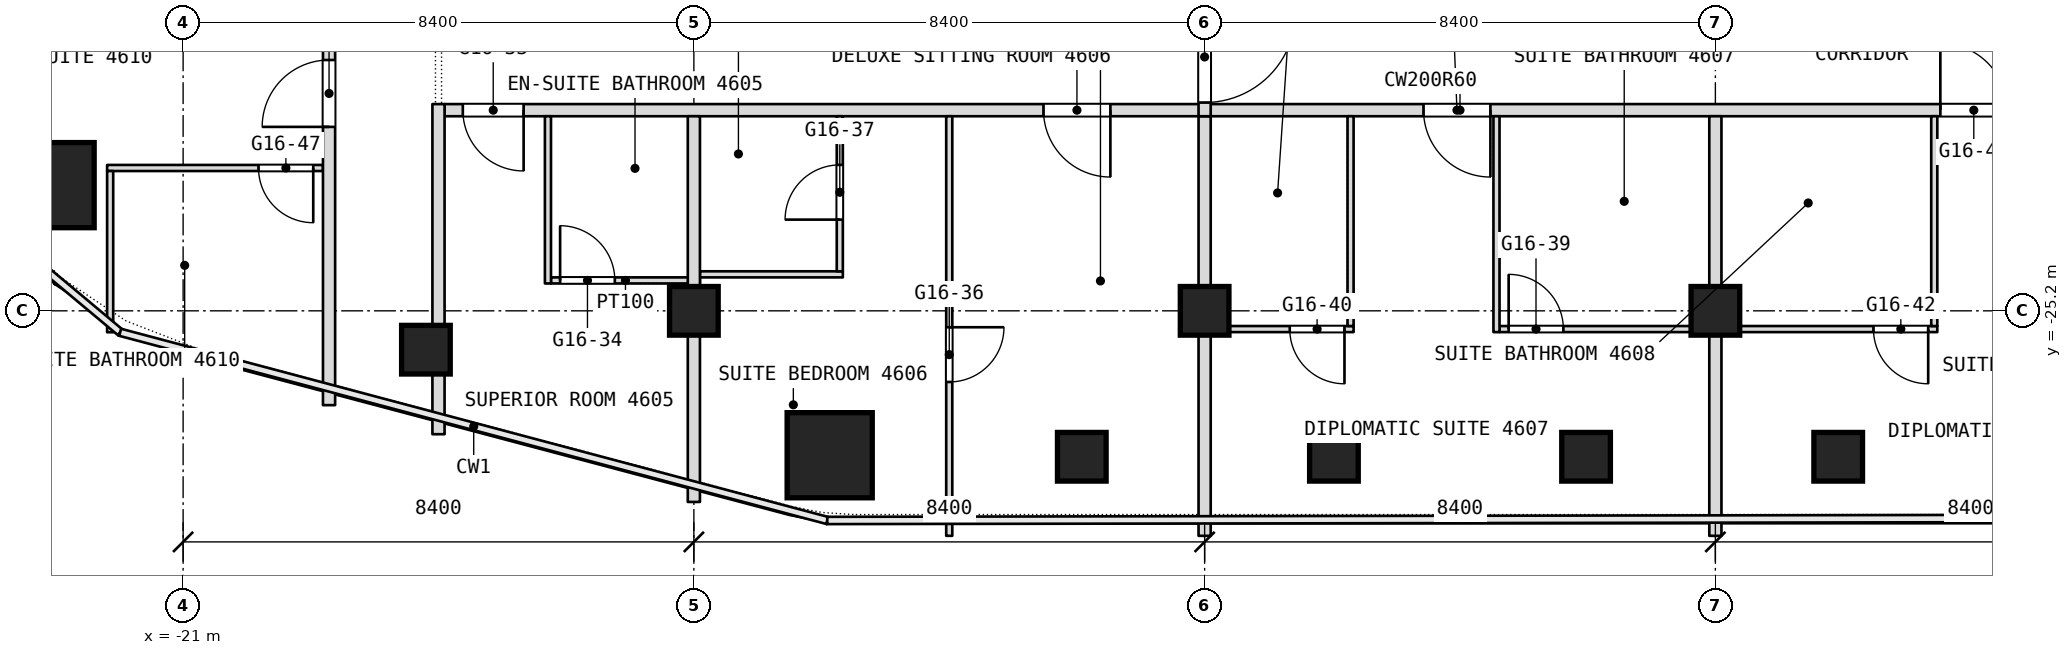
"""IFC4 building model, lengths in metres.
Left out: names, types, materials, properties, quantities, classifications, styles, units other than length and angle.
Written with IfcOpenShell. Run it as: python <this file> out.ifc"""

import sys

from ifc_helpers import new_model, si_unit, direction, frame, frame_2d, origin, origin_2d, place, context, subcontext, project, spatial, rectangle, extrude, element, fill, save


model = new_model("IFC4")
c1 = context("Model", 3, precision=1e-05, world=origin(), true_north=direction((0.0, 1.0)))
c2 = subcontext(c1, "Body", "Model", "MODEL_VIEW")
j1 = project(units=[si_unit("LENGTHUNIT", "METRE"), si_unit("PLANEANGLEUNIT", "RADIAN")], contexts=[c1])
p1 = place(None, origin())
s1 = spatial("IfcSite", under=j1, at=p1, CompositionType="ELEMENT")
p2 = place(p1, origin())
s2 = spatial("IfcBuilding", under=s1, at=p2, CompositionType="ELEMENT")
p3 = place(p2, frame((0.0, 0.0, 202.1)))
s3 = spatial("IfcBuildingStorey", under=s2, at=p3, CompositionType="ELEMENT", Elevation=202.1)
for number, where, z_axis, x_axis in (
    (1, (-23.163, -23.133, 0.0), (0.0, 0.0, 1.0), (1.0, 0.0, 0.0)),
    (2, (-10.366, -27.575, 0.0), (0.0, 0.0, 1.0), (1.0, 0.0, 0.0)),
):
    element("IfcColumn", number, at=place(p3, frame(where, z_axis=z_axis, x_axis=x_axis)), inside=s3, PredefinedType="COLUMN", context=c2, shape_type="SweptSolid", body=[
        extrude(rectangle(XDim=1.4, YDim=1.4, at=origin_2d()), origin(), (0.0, 0.0, 1.0), 3.6),
    ])
for number, where, z_axis, x_axis in (
    (3, (-12.6, -25.2, 0.0), (0.0, 0.0, 1.0), (1.0, 0.0, 0.0)),
    (4, (-4.2, -25.2, 0.0), (0.0, 0.0, 1.0), (1.0, 0.0, 0.0)),
    (5, (4.2, -25.2, 0.0), (0.0, 0.0, 1.0), (1.0, 0.0, 0.0)),
    (6, (6.22, -27.6, 0.0), (0.0, 0.0, 1.0), (1.0, 0.0, 0.0)),
    (7, (2.073, -27.6, 0.0), (0.0, 0.0, 1.0), (1.0, 0.0, 0.0)),
    (8, (-2.073, -27.6, 0.0), (0.0, 0.0, 1.0), (1.0, 0.0, 0.0)),
    (9, (-6.22, -27.6, 0.0), (0.0, 0.0, 1.0), (1.0, 0.0, 0.0)),
    (10, (-17.007, -25.839, 0.0), (0.0, 0.0, 1.0), (1.0, 0.0, 0.0)),
):
    element("IfcColumn", number, at=place(p3, frame(where, z_axis=z_axis, x_axis=x_axis)), inside=s3, PredefinedType="COLUMN", context=c2, shape_type="SweptSolid", body=[
        extrude(rectangle(XDim=0.8, YDim=0.8, at=origin_2d()), origin(), (0.0, 0.0, 1.0), 3.6),
    ])
p4 = place(p3, frame((-4.1, -25.5, 0.0), z_axis=(0.0, 0.0, 1.0), x_axis=(1.0, 0.0, 0.0)))
e11 = element("IfcWall", 11, at=p4, inside=s3, PredefinedType="PARTITIONING", context=c2, shape_type="SweptSolid", body=[
    extrude(rectangle(XDim=2.35, YDim=0.1, at=frame_2d((1.175, 0.0))), origin(), (0.0, 0.0, 1.0), 3.34),
])
p5 = place(p4, frame((1.3, 0.0, 0.0)))
e12 = element("IfcOpeningElement", 12, at=p5, cuts=e11, PredefinedType="OPENING", context=c2, shape_type="SweptSolid", body=[
    extrude(rectangle(XDim=0.9, YDim=2.1, at=frame_2d((0.45, 1.05))), frame((0.0, 0.05, 0.0), z_axis=(0.0, -1.0, 0.0), x_axis=(1.0, 0.0, 0.0)), (0.0, 0.0, 1.0), 0.1),
])
p6 = place(p3, frame((0.65, -25.5, 0.0), z_axis=(0.0, 0.0, 1.0), x_axis=(1.0, 0.0, 0.0)))
e13 = element("IfcWall", 13, at=p6, inside=s3, PredefinedType="PARTITIONING", context=c2, shape_type="SweptSolid", body=[
    extrude(rectangle(XDim=7.2, YDim=0.1, at=frame_2d((3.6, 0.0))), origin(), (0.0, 0.0, 1.0), 3.34),
])
p7 = place(p6, frame((0.15, 0.0, 0.0)))
e14 = element("IfcOpeningElement", 14, at=p7, cuts=e13, PredefinedType="OPENING", context=c2, shape_type="SweptSolid", body=[
    extrude(rectangle(XDim=0.9, YDim=2.1, at=frame_2d((0.45, 1.05))), frame((0.0, 0.05, 0.0), z_axis=(0.0, -1.0, 0.0), x_axis=(1.0, 0.0, 0.0)), (0.0, 0.0, 1.0), 0.1),
])
p8 = place(p6, frame((6.15, 0.0, 0.0)))
e15 = element("IfcOpeningElement", 15, at=p8, cuts=e13, PredefinedType="OPENING", context=c2, shape_type="SweptSolid", body=[
    extrude(rectangle(XDim=0.9, YDim=2.1, at=frame_2d((0.45, 1.05))), frame((0.0, 0.05, 0.0), z_axis=(0.0, -1.0, 0.0), x_axis=(1.0, 0.0, 0.0)), (0.0, 0.0, 1.0), 0.1),
])
p9 = place(p3, frame((-14.95, -24.7, 0.0), z_axis=(0.0, 0.0, 1.0), x_axis=(1.0, 0.0, 0.0)))
e16 = element("IfcWall", 16, at=p9, inside=s3, PredefinedType="PARTITIONING", context=c2, shape_type="SweptSolid", body=[
    extrude(rectangle(XDim=2.45, YDim=0.1, at=frame_2d((1.225, 0.0))), origin(), (0.0, 0.0, 1.0), 3.34),
])
p10 = place(p9, frame((0.15, 0.0, 0.0)))
e17 = element("IfcOpeningElement", 17, at=p10, cuts=e16, PredefinedType="OPENING", context=c2, shape_type="SweptSolid", body=[
    extrude(rectangle(XDim=0.9, YDim=2.1, at=frame_2d((0.45, 1.05))), frame((0.0, 0.05, 0.0), z_axis=(0.0, -1.0, 0.0), x_axis=(1.0, 0.0, 0.0)), (0.0, 0.0, 1.0), 0.1),
])
p11 = place(p3, frame((-12.5, -24.6, 0.0), z_axis=(0.0, 0.0, 1.0), x_axis=(1.0, 0.0, 0.0)))
e18 = element("IfcWall", 18, at=p11, inside=s3, PredefinedType="PARTITIONING", context=c2, shape_type="SweptSolid", body=[
    extrude(rectangle(XDim=2.35, YDim=0.1, at=frame_2d((1.175, 0.0))), origin(), (0.0, 0.0, 1.0), 3.34),
])
p12 = place(p3, frame((-22.25, -22.851, 0.0), z_axis=(0.0, 0.0, 1.0), x_axis=(1.0, 0.0, 0.0)))
e19 = element("IfcWall", 19, at=p12, inside=s3, PredefinedType="PARTITIONING", context=c2, shape_type="SweptSolid", body=[
    extrude(rectangle(XDim=3.55, YDim=0.1, at=frame_2d((1.775, 0.0))), origin(), (0.0, 0.0, 1.0), 3.34),
])
p13 = place(p12, frame((2.49, 0.0, 0.0)))
e20 = element("IfcOpeningElement", 20, at=p13, cuts=e19, PredefinedType="OPENING", context=c2, shape_type="SweptSolid", body=[
    extrude(rectangle(XDim=0.9, YDim=2.1, at=frame_2d((0.45, 1.05))), frame((0.0, 0.05, 0.0), z_axis=(0.0, -1.0, 0.0), x_axis=(1.0, 0.0, 0.0)), (0.0, 0.0, 1.0), 0.1),
])
p14 = place(p3, frame((-16.7, -21.9, 0.0), z_axis=(0.0, 0.0, 1.0), x_axis=(1.0, 0.0, 0.0)))
e21 = element("IfcWall", 21, at=p14, inside=s3, PredefinedType="PARTITIONING", context=c2, shape_type="SweptSolid", body=[
    extrude(rectangle(XDim=33.4, YDim=0.2, at=frame_2d((16.7, 0.0))), origin(), (0.0, 0.0, 1.0), 3.34),
])
p15 = place(p14, frame((0.3, 0.0, 0.0)))
e22 = element("IfcOpeningElement", 22, at=p15, cuts=e21, PredefinedType="OPENING", context=c2, shape_type="SweptSolid", body=[
    extrude(rectangle(XDim=1.0, YDim=2.1, at=frame_2d((0.5, 1.05))), frame((0.0, 0.1, 0.0), z_axis=(0.0, -1.0, 0.0), x_axis=(1.0, 0.0, 0.0)), (0.0, 0.0, 1.0), 0.2),
])
p16 = place(p14, frame((9.85, 0.0, 0.0)))
e23 = element("IfcOpeningElement", 23, at=p16, cuts=e21, PredefinedType="OPENING", context=c2, shape_type="SweptSolid", body=[
    extrude(rectangle(XDim=1.1, YDim=2.1, at=frame_2d((0.55, 1.05))), frame((0.0, 0.1, 0.0), z_axis=(0.0, -1.0, 0.0), x_axis=(1.0, 0.0, 0.0)), (0.0, 0.0, 1.0), 0.2),
])
p17 = place(p14, frame((16.1, 0.0, 0.0)))
e24 = element("IfcOpeningElement", 24, at=p17, cuts=e21, PredefinedType="OPENING", context=c2, shape_type="SweptSolid", body=[
    extrude(rectangle(XDim=1.1, YDim=2.1, at=frame_2d((0.55, 1.05))), frame((0.0, 0.1, 0.0), z_axis=(0.0, -1.0, 0.0), x_axis=(1.0, 0.0, 0.0)), (0.0, 0.0, 1.0), 0.2),
])
p18 = place(p14, frame((24.6, 0.0, 0.0)))
e25 = element("IfcOpeningElement", 25, at=p18, cuts=e21, PredefinedType="OPENING", context=c2, shape_type="SweptSolid", body=[
    extrude(rectangle(XDim=1.1, YDim=2.1, at=frame_2d((0.55, 1.05))), frame((0.0, 0.1, 0.0), z_axis=(0.0, -1.0, 0.0), x_axis=(1.0, 0.0, 0.0)), (0.0, 0.0, 1.0), 0.2),
])
p19 = place(p14, frame((29.7, 0.0, 0.0)))
e26 = element("IfcOpeningElement", 26, at=p19, cuts=e21, PredefinedType="OPENING", context=c2, shape_type="SweptSolid", body=[
    extrude(rectangle(XDim=1.0, YDim=2.1, at=frame_2d((0.5, 1.05))), frame((0.0, 0.1, 0.0), z_axis=(0.0, -1.0, 0.0), x_axis=(1.0, 0.0, 0.0)), (0.0, 0.0, 1.0), 0.2),
])
p20 = place(p3, frame((7.8, -25.45, 0.0), z_axis=(0.0, 0.0, 1.0), x_axis=(0.0, 1.0, 0.0)))
e27 = element("IfcWall", 27, at=p20, inside=s3, PredefinedType="PARTITIONING", context=c2, shape_type="SweptSolid", body=[
    extrude(rectangle(XDim=3.45, YDim=0.1, at=frame_2d((1.725, 0.0))), origin(), (0.0, 0.0, 1.0), 3.34),
])
p21 = place(p3, frame((4.2, -28.9, 0.0), z_axis=(0.0, 0.0, 1.0), x_axis=(0.0, 1.0, 0.0)))
e28 = element("IfcWall", 28, at=p21, inside=s3, PredefinedType="PARTITIONING", context=c2, shape_type="SweptSolid", body=[
    extrude(rectangle(XDim=6.9, YDim=0.2, at=frame_2d((3.45, 0.0))), origin(), (0.0, 0.0, 1.0), 3.34),
])
p22 = place(p3, frame((0.6, -25.55, 0.0), z_axis=(0.0, 0.0, 1.0), x_axis=(0.0, 1.0, 0.0)))
e29 = element("IfcWall", 29, at=p22, inside=s3, PredefinedType="PARTITIONING", context=c2, shape_type="SweptSolid", body=[
    extrude(rectangle(XDim=3.55, YDim=0.1, at=frame_2d((1.775, 0.0))), origin(), (0.0, 0.0, 1.0), 3.34),
])
p23 = place(p3, frame((-1.8, -25.45, 0.0), z_axis=(0.0, 0.0, 1.0), x_axis=(0.0, 1.0, 0.0)))
e30 = element("IfcWall", 30, at=p23, inside=s3, PredefinedType="PARTITIONING", context=c2, shape_type="SweptSolid", body=[
    extrude(rectangle(XDim=3.45, YDim=0.1, at=frame_2d((1.725, 0.0))), origin(), (0.0, 0.0, 1.0), 3.34),
])
p24 = place(p3, frame((-4.2, -28.9, 0.0), z_axis=(0.0, 0.0, 1.0), x_axis=(0.0, 1.0, 0.0)))
e31 = element("IfcWall", 31, at=p24, inside=s3, PredefinedType="PARTITIONING", context=c2, shape_type="SweptSolid", body=[
    extrude(rectangle(XDim=6.9, YDim=0.2, at=frame_2d((3.45, 0.0))), origin(), (0.0, 0.0, 1.0), 3.34),
])
p25 = place(p3, frame((-4.2, -22.0, 0.0), z_axis=(0.0, 0.0, 1.0), x_axis=(0.0, 1.0, 0.0)))
e32 = element("IfcWall", 32, at=p25, inside=s3, PredefinedType="PARTITIONING", context=c2, shape_type="SweptSolid", body=[
    extrude(rectangle(XDim=8.4, YDim=0.2, at=frame_2d((4.2, 0.0))), origin(), (0.0, 0.0, 1.0), 3.34),
])
p26 = place(p25, frame((0.225, 0.0, 0.0)))
e33 = element("IfcOpeningElement", 33, at=p26, cuts=e32, PredefinedType="OPENING", context=c2, shape_type="SweptSolid", body=[
    extrude(rectangle(XDim=1.5, YDim=2.1, at=frame_2d((0.75, 1.05))), frame((0.0, 0.1, 0.0), z_axis=(0.0, -1.0, 0.0), x_axis=(1.0, 0.0, 0.0)), (0.0, 0.0, 1.0), 0.2),
])
p27 = place(p3, frame((-8.4, -28.9, 0.0), z_axis=(0.0, 0.0, 1.0), x_axis=(0.0, 1.0, 0.0)))
e34 = element("IfcWall", 34, at=p27, inside=s3, PredefinedType="PARTITIONING", context=c2, shape_type="SweptSolid", body=[
    extrude(rectangle(XDim=6.9, YDim=0.1, at=frame_2d((3.45, 0.0))), origin(), (0.0, 0.0, 1.0), 3.34),
])
p28 = place(p27, frame((2.53, 0.0, 0.0)))
e35 = element("IfcOpeningElement", 35, at=p28, cuts=e34, PredefinedType="OPENING", context=c2, shape_type="SweptSolid", body=[
    extrude(rectangle(XDim=0.9, YDim=2.1, at=frame_2d((0.45, 1.05))), frame((0.0, 0.05, 0.0), z_axis=(0.0, -1.0, 0.0), x_axis=(1.0, 0.0, 0.0)), (0.0, 0.0, 1.0), 0.1),
])
p29 = place(p3, frame((-10.2, -24.55, 0.0), z_axis=(0.0, 0.0, 1.0), x_axis=(0.0, 1.0, 0.0)))
e36 = element("IfcWall", 36, at=p29, inside=s3, PredefinedType="PARTITIONING", context=c2, shape_type="SweptSolid", body=[
    extrude(rectangle(XDim=2.55, YDim=0.1, at=frame_2d((1.275, 0.0))), origin(), (0.0, 0.0, 1.0), 3.34),
])
p30 = place(p29, frame((0.85, 0.0, 0.0)))
e37 = element("IfcOpeningElement", 37, at=p30, cuts=e36, PredefinedType="OPENING", context=c2, shape_type="SweptSolid", body=[
    extrude(rectangle(XDim=0.9, YDim=2.1, at=frame_2d((0.45, 1.05))), frame((0.0, 0.05, 0.0), z_axis=(0.0, -1.0, 0.0), x_axis=(1.0, 0.0, 0.0)), (0.0, 0.0, 1.0), 0.1),
])
p31 = place(p3, frame((-12.6, -28.343, 0.0), z_axis=(0.0, 0.0, 1.0), x_axis=(0.0, 1.0, 0.0)))
e38 = element("IfcWall", 38, at=p31, inside=s3, PredefinedType="PARTITIONING", context=c2, shape_type="SweptSolid", body=[
    extrude(rectangle(XDim=6.343, YDim=0.2, at=frame_2d((3.171, 0.0))), origin(), (0.0, 0.0, 1.0), 3.34),
])
p32 = place(p3, frame((-15.0, -24.75, 0.0), z_axis=(0.0, 0.0, 1.0), x_axis=(0.0, 1.0, 0.0)))
e39 = element("IfcWall", 39, at=p32, inside=s3, PredefinedType="PARTITIONING", context=c2, shape_type="SweptSolid", body=[
    extrude(rectangle(XDim=2.75, YDim=0.1, at=frame_2d((1.375, 0.0))), origin(), (0.0, 0.0, 1.0), 3.34),
])
p33 = place(p3, frame((-16.8, -27.229, 0.0), z_axis=(0.0, 0.0, 1.0), x_axis=(0.0, 1.0, 0.0)))
e40 = element("IfcWall", 40, at=p33, inside=s3, PredefinedType="PARTITIONING", context=c2, shape_type="SweptSolid", body=[
    extrude(rectangle(XDim=5.429, YDim=0.2, at=frame_2d((2.714, 0.0))), origin(), (0.0, 0.0, 1.0), 3.34),
])
p34 = place(p3, frame((-18.6, -26.751, 0.0), z_axis=(0.0, 0.0, 1.0), x_axis=(0.0, 1.0, 0.0)))
e41 = element("IfcWall", 41, at=p34, inside=s3, PredefinedType="PARTITIONING", context=c2, shape_type="SweptSolid", body=[
    extrude(rectangle(XDim=49.091, YDim=0.2, at=frame_2d((24.545, 0.0))), origin(), (0.0, 0.0, 1.0), 3.34),
])
p35 = place(p34, frame((4.576, 0.0, 0.0)))
e42 = element("IfcOpeningElement", 42, at=p35, cuts=e41, PredefinedType="OPENING", context=c2, shape_type="SweptSolid", body=[
    extrude(rectangle(XDim=1.1, YDim=2.1, at=frame_2d((0.55, 1.05))), frame((0.0, 0.1, 0.0), z_axis=(0.0, -1.0, 0.0), x_axis=(1.0, 0.0, 0.0)), (0.0, 0.0, 1.0), 0.2),
])
p36 = place(p34, frame((10.351, 0.0, 0.0)))
e43 = element("IfcOpeningElement", 43, at=p36, cuts=e41, PredefinedType="OPENING", context=c2, shape_type="SweptSolid", body=[
    extrude(rectangle(XDim=1.0, YDim=2.1, at=frame_2d((0.5, 1.05))), frame((0.0, 0.1, 0.0), z_axis=(0.0, -1.0, 0.0), x_axis=(1.0, 0.0, 0.0)), (0.0, 0.0, 1.0), 0.2),
])
p37 = place(p34, frame((16.951, 0.0, 0.0)))
e44 = element("IfcOpeningElement", 44, at=p37, cuts=e41, PredefinedType="OPENING", context=c2, shape_type="SweptSolid", body=[
    extrude(rectangle(XDim=1.0, YDim=2.1, at=frame_2d((0.5, 1.05))), frame((0.0, 0.1, 0.0), z_axis=(0.0, -1.0, 0.0), x_axis=(1.0, 0.0, 0.0)), (0.0, 0.0, 1.0), 0.2),
])
p38 = place(p34, frame((22.051, 0.0, 0.0)))
e45 = element("IfcOpeningElement", 45, at=p38, cuts=e41, PredefinedType="OPENING", context=c2, shape_type="SweptSolid", body=[
    extrude(rectangle(XDim=1.1, YDim=2.1, at=frame_2d((0.55, 1.05))), frame((0.0, 0.1, 0.0), z_axis=(0.0, -1.0, 0.0), x_axis=(1.0, 0.0, 0.0)), (0.0, 0.0, 1.0), 0.2),
])
p39 = place(p34, frame((30.351, 0.0, 0.0)))
e46 = element("IfcOpeningElement", 46, at=p39, cuts=e41, PredefinedType="OPENING", context=c2, shape_type="SweptSolid", body=[
    extrude(rectangle(XDim=1.1, YDim=2.1, at=frame_2d((0.55, 1.05))), frame((0.0, 0.1, 0.0), z_axis=(0.0, -1.0, 0.0), x_axis=(1.0, 0.0, 0.0)), (0.0, 0.0, 1.0), 0.2),
])
p40 = place(p34, frame((40.901, 0.0, 0.0)))
e47 = element("IfcOpeningElement", 47, at=p40, cuts=e41, PredefinedType="OPENING", context=c2, shape_type="SweptSolid", body=[
    extrude(rectangle(XDim=1.1, YDim=2.1, at=frame_2d((0.55, 1.05))), frame((0.0, 0.1, 0.0), z_axis=(0.0, -1.0, 0.0), x_axis=(1.0, 0.0, 0.0)), (0.0, 0.0, 1.0), 0.2),
])
p41 = place(p34, frame((44.051, 0.0, 0.0)))
e48 = element("IfcOpeningElement", 48, at=p41, cuts=e41, PredefinedType="OPENING", context=c2, shape_type="SweptSolid", body=[
    extrude(rectangle(XDim=1.0, YDim=2.1, at=frame_2d((0.5, 1.05))), frame((0.0, 0.1, 0.0), z_axis=(0.0, -1.0, 0.0), x_axis=(1.0, 0.0, 0.0)), (0.0, 0.0, 1.0), 0.2),
])
p42 = place(p3, frame((-22.2, -25.552, 0.0), z_axis=(0.0, 0.0, 1.0), x_axis=(0.0, 1.0, 0.0)))
e49 = element("IfcWall", 49, at=p42, inside=s3, PredefinedType="PARTITIONING", context=c2, shape_type="SweptSolid", body=[
    extrude(rectangle(XDim=2.651, YDim=0.1, at=frame_2d((1.326, 0.0))), origin(), (0.0, 0.0, 1.0), 3.34),
])
p43 = place(p5, origin())
e50 = element("IfcDoor", 50, at=p43, inside=s3, OperationType="SINGLE_SWING_RIGHT", PredefinedType="DOOR", context=c2, shape_type="SweptSolid", body=[
    extrude(rectangle(XDim=0.9, YDim=2.1, at=frame_2d((0.45, 1.05))), frame((0.0, 0.025, 0.0), z_axis=(0.0, -1.0, 0.0), x_axis=(1.0, 0.0, 0.0)), (0.0, 0.0, 1.0), 0.05),
])
fill(e12, e50)
p44 = place(p7, origin())
e51 = element("IfcDoor", 51, at=p44, inside=s3, OperationType="SINGLE_SWING_LEFT", PredefinedType="DOOR", context=c2, shape_type="SweptSolid", body=[
    extrude(rectangle(XDim=0.9, YDim=2.1, at=frame_2d((0.45, 1.05))), frame((0.0, 0.025, 0.0), z_axis=(0.0, -1.0, 0.0), x_axis=(1.0, 0.0, 0.0)), (0.0, 0.0, 1.0), 0.05),
])
fill(e14, e51)
p45 = place(p8, origin())
e52 = element("IfcDoor", 52, at=p45, inside=s3, OperationType="SINGLE_SWING_RIGHT", PredefinedType="DOOR", context=c2, shape_type="SweptSolid", body=[
    extrude(rectangle(XDim=0.9, YDim=2.1, at=frame_2d((0.45, 1.05))), frame((0.0, 0.025, 0.0), z_axis=(0.0, -1.0, 0.0), x_axis=(1.0, 0.0, 0.0)), (0.0, 0.0, 1.0), 0.05),
])
fill(e15, e52)
p46 = place(p10, origin())
e53 = element("IfcDoor", 53, at=p46, inside=s3, OperationType="SINGLE_SWING_LEFT", PredefinedType="DOOR", context=c2, shape_type="SweptSolid", body=[
    extrude(rectangle(XDim=0.9, YDim=2.1, at=frame_2d((0.45, 1.05))), frame((0.0, 0.025, 0.0), z_axis=(0.0, -1.0, 0.0), x_axis=(1.0, 0.0, 0.0)), (0.0, 0.0, 1.0), 0.05),
])
fill(e17, e53)
p47 = place(p13, origin())
e54 = element("IfcDoor", 54, at=p47, inside=s3, OperationType="SINGLE_SWING_LEFT", PredefinedType="DOOR", context=c2, shape_type="SweptSolid", body=[
    extrude(rectangle(XDim=0.9, YDim=2.1, at=frame_2d((0.45, 1.05))), frame((0.0, 0.025, 0.0), z_axis=(0.0, -1.0, 0.0), x_axis=(1.0, 0.0, 0.0)), (0.0, 0.0, 1.0), 0.05),
])
fill(e20, e54)
p48 = place(p15, origin())
e55 = element("IfcDoor", 55, at=p48, inside=s3, OperationType="SINGLE_SWING_RIGHT", PredefinedType="DOOR", context=c2, shape_type="SweptSolid", body=[
    extrude(rectangle(XDim=1.0, YDim=2.1, at=frame_2d((0.5, 1.05))), frame((0.0, 0.025, 0.0), z_axis=(0.0, -1.0, 0.0), x_axis=(1.0, 0.0, 0.0)), (0.0, 0.0, 1.0), 0.05),
])
fill(e22, e55)
p49 = place(p16, origin())
e56 = element("IfcDoor", 56, at=p49, inside=s3, OperationType="SINGLE_SWING_LEFT", PredefinedType="DOOR", context=c2, shape_type="SweptSolid", body=[
    extrude(rectangle(XDim=1.1, YDim=2.1, at=frame_2d((0.55, 1.05))), frame((0.0, 0.025, 0.0), z_axis=(0.0, -1.0, 0.0), x_axis=(1.0, 0.0, 0.0)), (0.0, 0.0, 1.0), 0.05),
])
fill(e23, e56)
p50 = place(p17, origin())
e57 = element("IfcDoor", 57, at=p50, inside=s3, OperationType="SINGLE_SWING_LEFT", PredefinedType="DOOR", context=c2, shape_type="SweptSolid", body=[
    extrude(rectangle(XDim=1.1, YDim=2.1, at=frame_2d((0.55, 1.05))), frame((0.0, 0.025, 0.0), z_axis=(0.0, -1.0, 0.0), x_axis=(1.0, 0.0, 0.0)), (0.0, 0.0, 1.0), 0.05),
])
fill(e24, e57)
p51 = place(p18, origin())
e58 = element("IfcDoor", 58, at=p51, inside=s3, OperationType="SINGLE_SWING_RIGHT", PredefinedType="DOOR", context=c2, shape_type="SweptSolid", body=[
    extrude(rectangle(XDim=1.1, YDim=2.1, at=frame_2d((0.55, 1.05))), frame((0.0, 0.025, 0.0), z_axis=(0.0, -1.0, 0.0), x_axis=(1.0, 0.0, 0.0)), (0.0, 0.0, 1.0), 0.05),
])
fill(e25, e58)
p52 = place(p28, origin())
e59 = element("IfcDoor", 59, at=p52, inside=s3, OperationType="SINGLE_SWING_LEFT", PredefinedType="DOOR", context=c2, shape_type="SweptSolid", body=[
    extrude(rectangle(XDim=0.9, YDim=2.1, at=frame_2d((0.45, 1.05))), frame((0.0, 0.025, 0.0), z_axis=(0.0, -1.0, 0.0), x_axis=(1.0, 0.0, 0.0)), (0.0, 0.0, 1.0), 0.05),
])
fill(e35, e59)
p53 = place(p30, origin())
e60 = element("IfcDoor", 60, at=p53, inside=s3, OperationType="SINGLE_SWING_RIGHT", PredefinedType="DOOR", context=c2, shape_type="SweptSolid", body=[
    extrude(rectangle(XDim=0.9, YDim=2.1, at=frame_2d((0.45, 1.05))), frame((0.0, 0.025, 0.0), z_axis=(0.0, -1.0, 0.0), x_axis=(1.0, 0.0, 0.0)), (0.0, 0.0, 1.0), 0.05),
])
fill(e37, e60)
p54 = place(p35, origin())
e61 = element("IfcDoor", 61, at=p54, inside=s3, OperationType="SINGLE_SWING_LEFT", PredefinedType="DOOR", context=c2, shape_type="SweptSolid", body=[
    extrude(rectangle(XDim=1.1, YDim=2.1, at=frame_2d((0.55, 1.05))), frame((0.0, 0.025, 0.0), z_axis=(0.0, -1.0, 0.0), x_axis=(1.0, 0.0, 0.0)), (0.0, 0.0, 1.0), 0.05),
])
fill(e42, e61)
p55 = place(p26, origin())
e62 = element("IfcDoor", 62, at=p55, inside=s3, OperationType="DOUBLE_DOOR_DOUBLE_SWING", PredefinedType="DOOR", context=c2, shape_type="SweptSolid", body=[
    extrude(rectangle(XDim=1.5, YDim=2.1, at=frame_2d((0.75, 1.05))), frame((0.0, 0.025, 0.0), z_axis=(0.0, -1.0, 0.0), x_axis=(1.0, 0.0, 0.0)), (0.0, 0.0, 1.0), 0.05),
])
fill(e33, e62)
save(model, sys.argv[1])
